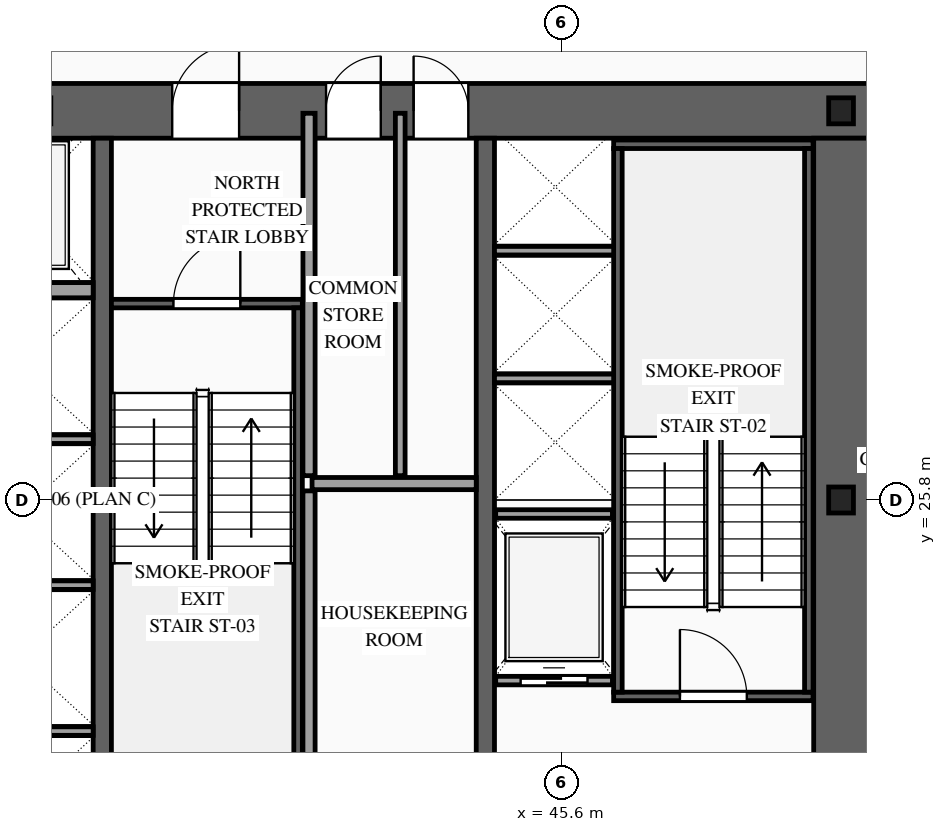
"""IFC4 building model, lengths in metres.
Left out: names, types, materials, properties, quantities, classifications, styles, units other than length and angle.
Written with IfcOpenShell. Run it as: python <this file> out.ifc"""

import sys

from ifc_helpers import new_model, si_unit, direction, frame, frame_2d, origin, origin_2d, place, context, subcontext, project, spatial, rectangle, i_section, extrude, source, transform, mapped, element, fill, save


model = new_model("IFC4")
c1 = context("Model", 3, precision=1e-05, world=origin(), true_north=direction((0.0, 1.0)))
c2 = subcontext(c1, "Body", "Model", "MODEL_VIEW")
j1 = project(units=[si_unit("LENGTHUNIT", "METRE"), si_unit("PLANEANGLEUNIT", "RADIAN")], contexts=[c1])
p1 = place(None, origin())
s1 = spatial("IfcSite", under=j1, at=p1, CompositionType="ELEMENT")
p2 = place(p1, origin())
s2 = spatial("IfcBuilding", under=s1, at=p2, CompositionType="ELEMENT")
p3 = place(p2, frame((0.0, 0.0, 71.2)))
s3 = spatial("IfcBuildingStorey", under=s2, at=p3, CompositionType="ELEMENT", Elevation=71.2)
p4 = place(p3, frame((23.35, 32.2, 0.0), z_axis=(0.0, 0.0, 1.0), x_axis=(1.0, 0.0, 0.0)))
e1 = element("IfcWall", 1, at=p4, inside=s3, PredefinedType="SHEAR", context=c2, shape_type="SweptSolid", body=[
    extrude(rectangle(XDim=27.3, YDim=0.9, at=frame_2d((13.65, 0.0))), origin(), (0.0, 0.0, 1.0), 3.6),
])
p5 = place(p4, frame((4.72, 0.0, 0.0)))
e2 = element("IfcOpeningElement", 2, at=p5, cuts=e1, PredefinedType="OPENING", context=c2, shape_type="SweptSolid", body=[
    extrude(rectangle(XDim=0.9, YDim=2.15, at=frame_2d((0.45, 1.075))), frame((0.0, 0.465, 0.0), z_axis=(0.0, -1.0, 0.0), x_axis=(1.0, 0.0, 0.0)), (0.0, 0.0, 1.0), 0.93),
])
p6 = place(p4, frame((10.0, 0.0, 0.0)))
e3 = element("IfcOpeningElement", 3, at=p6, cuts=e1, PredefinedType="OPENING", context=c2, shape_type="SweptSolid", body=[
    extrude(rectangle(XDim=1.1, YDim=2.2, at=frame_2d((0.55, 1.1))), frame((0.0, 0.465, 0.0), z_axis=(0.0, -1.0, 0.0), x_axis=(1.0, 0.0, 0.0)), (0.0, 0.0, 1.0), 0.93),
])
p7 = place(p4, frame((15.85, 0.0, 0.0)))
e4 = element("IfcOpeningElement", 4, at=p7, cuts=e1, PredefinedType="OPENING", context=c2, shape_type="SweptSolid", body=[
    extrude(rectangle(XDim=1.1, YDim=2.2, at=frame_2d((0.55, 1.1))), frame((0.0, 0.465, 0.0), z_axis=(0.0, -1.0, 0.0), x_axis=(1.0, 0.0, 0.0)), (0.0, 0.0, 1.0), 0.93),
])
p8 = place(p4, frame((18.38, 0.0, 0.0)))
e5 = element("IfcOpeningElement", 5, at=p8, cuts=e1, PredefinedType="OPENING", context=c2, shape_type="SweptSolid", body=[
    extrude(rectangle(XDim=0.9, YDim=2.15, at=frame_2d((0.45, 1.075))), frame((0.0, 0.465, 0.0), z_axis=(0.0, -1.0, 0.0), x_axis=(1.0, 0.0, 0.0)), (0.0, 0.0, 1.0), 0.93),
])
p9 = place(p4, frame((19.82, 0.0, 0.0)))
e6 = element("IfcOpeningElement", 6, at=p9, cuts=e1, PredefinedType="OPENING", context=c2, shape_type="SweptSolid", body=[
    extrude(rectangle(XDim=0.9, YDim=2.15, at=frame_2d((0.45, 1.075))), frame((0.0, 0.465, 0.0), z_axis=(0.0, -1.0, 0.0), x_axis=(1.0, 0.0, 0.0)), (0.0, 0.0, 1.0), 0.93),
])
m1 = source(origin(), c2, "Body", "SweptSolid", [
    extrude(rectangle(XDim=11.9, YDim=0.9, at=frame_2d((5.95, 0.0))), origin(), (0.0, 0.0, 1.0), 3.6),
])
p10 = place(p3, frame((50.2, 19.85, 0.0), z_axis=(0.0, 0.0, 1.0), x_axis=(0.0, 1.0, 0.0)))
e7 = element("IfcWall", 7, at=p10, inside=s3, PredefinedType="SHEAR", context=c2, shape_type="MappedRepresentation", body=[
    mapped(m1, transform((0.0, 0.0, 0.0), scale=1.0)),
])
m2 = source(origin(), c2, "Body", "SweptSolid", [
    extrude(rectangle(XDim=11.9, YDim=0.3, at=frame_2d((5.95, 0.0))), origin(), (0.0, 0.0, 1.0), 3.6),
])
for number, where, z_axis, x_axis in (
    (8, (38.05, 19.85, 0.0), (0.0, 0.0, 1.0), (0.0, 1.0, 0.0)),
    (9, (44.35, 19.85, 0.0), (0.0, 0.0, 1.0), (0.0, 1.0, 0.0)),
):
    element("IfcWall", number, at=place(p3, frame(where, z_axis=z_axis, x_axis=x_axis)), inside=s3, PredefinedType="SOLIDWALL", context=c2, shape_type="MappedRepresentation", body=[
        mapped(m2, transform((0.0, 0.0, 0.0), scale=1.0)),
    ])
m3 = source(origin(), c2, "Body", "SweptSolid", [
    extrude(i_section(OverallWidth=0.407, OverallDepth=0.428, WebThickness=0.02, FlangeThickness=0.035, at=origin_2d()), origin(), (0.0, 0.0, 1.0), 3.6),
])
for number, where, z_axis, x_axis in (
    (10, (50.2, 25.8, 0.0), (0.0, 0.0, 1.0), (1.0, 0.0, 0.0)),
    (11, (50.2, 32.2, 0.0), (0.0, 0.0, 1.0), (1.0, 0.0, 0.0)),
):
    element("IfcColumn", number, at=place(p3, frame(where, z_axis=z_axis, x_axis=x_axis)), inside=s3, PredefinedType="COLUMN", context=c2, shape_type="MappedRepresentation", body=[
        mapped(m3, transform((0.0, 0.0, 0.0), scale=1.0)),
    ])
p11 = place(p3, frame((44.52, 22.83, 0.0), z_axis=(0.0, 0.0, 1.0), x_axis=(1.0, 0.0, 0.0)))
e12 = element("IfcWall", 12, at=p11, inside=s3, PredefinedType="SOLIDWALL", context=c2, shape_type="SweptSolid", body=[
    extrude(rectangle(XDim=1.92, YDim=0.14, at=frame_2d((0.96, 0.0))), origin(), (0.0, 0.0, 1.0), 3.38),
])
p12 = place(p11, frame((0.41, 0.0, 0.0)))
e13 = element("IfcOpeningElement", 13, at=p12, cuts=e12, PredefinedType="OPENING", context=c2, shape_type="SweptSolid", body=[
    extrude(rectangle(XDim=1.1, YDim=2.2, at=frame_2d((0.55, 1.1))), frame((0.0, 0.085, 0.0), z_axis=(0.0, -1.0, 0.0), x_axis=(1.0, 0.0, 0.0)), (0.0, 0.0, 1.0), 0.17),
])
m4 = source(origin(), c2, "Body", "SweptSolid", [
    extrude(rectangle(XDim=1.92, YDim=0.14, at=frame_2d((0.96, 0.0))), origin(), (0.0, 0.0, 1.0), 3.38),
])
p13 = place(p3, frame((44.52, 25.57, 0.0), z_axis=(0.0, 0.0, 1.0), x_axis=(1.0, 0.0, 0.0)))
e14 = element("IfcWall", 14, at=p13, inside=s3, PredefinedType="SOLIDWALL", context=c2, shape_type="MappedRepresentation", body=[
    mapped(m4, transform((0.0, 0.0, 0.0), scale=1.0)),
])
m5 = source(origin(), c2, "Body", "SweptSolid", [
    extrude(rectangle(XDim=2.4, YDim=0.14, at=frame_2d((1.2, 0.0))), origin(), (0.0, 0.0, 1.0), 3.38),
])
for number, where, z_axis, x_axis in (
    (15, (35.5, 22.0, 0.0), (0.0, 0.0, 1.0), (1.0, 0.0, 0.0)),
    (16, (35.5, 24.4, 0.0), (0.0, 0.0, 1.0), (1.0, 0.0, 0.0)),
    (17, (35.5, 26.8, 0.0), (0.0, 0.0, 1.0), (1.0, 0.0, 0.0)),
):
    element("IfcWall", number, at=place(p3, frame(where, z_axis=z_axis, x_axis=x_axis)), inside=s3, PredefinedType="SOLIDWALL", context=c2, shape_type="MappedRepresentation", body=[
        mapped(m5, transform((0.0, 0.0, 0.0), scale=1.0)),
    ])
m6 = source(origin(), c2, "Body", "SweptSolid", [
    extrude(rectangle(XDim=2.4, YDim=0.25, at=frame_2d((1.2, 0.0))), origin(), (0.0, 0.0, 1.0), 3.38),
])
p14 = place(p3, frame((35.5, 29.25, 0.0), z_axis=(0.0, 0.0, 1.0), x_axis=(1.0, 0.0, 0.0)))
e18 = element("IfcWall", 18, at=p14, inside=s3, PredefinedType="SOLIDWALL", context=c2, shape_type="MappedRepresentation", body=[
    mapped(m6, transform((0.0, 0.0, 0.0), scale=1.0)),
])
m7 = source(origin(), c2, "Body", "SweptSolid", [
    extrude(rectangle(XDim=2.0, YDim=0.14, at=frame_2d((1.0, 0.0))), origin(), (0.0, 0.0, 1.0), 3.38),
])
for number, where, z_axis, x_axis in (
    (19, (44.5, 27.8, 0.0), (0.0, 0.0, 1.0), (1.0, 0.0, 0.0)),
    (20, (44.5, 29.9, 0.0), (0.0, 0.0, 1.0), (1.0, 0.0, 0.0)),
):
    element("IfcWall", number, at=place(p3, frame(where, z_axis=z_axis, x_axis=x_axis)), inside=s3, PredefinedType="SOLIDWALL", context=c2, shape_type="MappedRepresentation", body=[
        mapped(m7, transform((0.0, 0.0, 0.0), scale=1.0)),
    ])
p15 = place(p3, frame((46.46, 22.57, 0.0), z_axis=(0.0, 0.0, 1.0), x_axis=(1.0, 0.0, 0.0)))
e21 = element("IfcWall", 21, at=p15, inside=s3, PredefinedType="SOLIDWALL", context=c2, shape_type="SweptSolid", body=[
    extrude(rectangle(XDim=3.28, YDim=0.14, at=frame_2d((1.64, 0.0))), origin(), (0.0, 0.0, 1.0), 3.38),
])
p16 = place(p15, frame((1.09, 0.0, 0.0)))
e22 = element("IfcOpeningElement", 22, at=p16, cuts=e21, PredefinedType="OPENING", context=c2, shape_type="SweptSolid", body=[
    extrude(rectangle(XDim=1.1, YDim=2.2, at=frame_2d((0.55, 1.1))), frame((0.0, 0.085, 0.0), z_axis=(0.0, -1.0, 0.0), x_axis=(1.0, 0.0, 0.0)), (0.0, 0.0, 1.0), 0.17),
])
m8 = source(origin(), c2, "Body", "SweptSolid", [
    extrude(rectangle(XDim=3.28, YDim=0.14, at=frame_2d((1.64, 0.0))), origin(), (0.0, 0.0, 1.0), 3.38),
])
p17 = place(p3, frame((46.46, 31.65, 0.0), z_axis=(0.0, 0.0, 1.0), x_axis=(1.0, 0.0, 0.0)))
e23 = element("IfcWall", 23, at=p17, inside=s3, PredefinedType="SOLIDWALL", context=c2, shape_type="MappedRepresentation", body=[
    mapped(m8, transform((0.0, 0.0, 0.0), scale=1.0)),
])
m9 = source(origin(), c2, "Body", "SweptSolid", [
    extrude(rectangle(XDim=8.94, YDim=0.14, at=frame_2d((4.47, 0.0))), origin(), (0.0, 0.0, 1.0), 3.38),
])
for number, where, z_axis, x_axis in (
    (24, (46.53, 22.64, 0.0), (0.0, 0.0, 1.0), (0.0, 1.0, 0.0)),
    (25, (49.67, 22.64, 0.0), (0.0, 0.0, 1.0), (0.0, 1.0, 0.0)),
):
    element("IfcWall", number, at=place(p3, frame(where, z_axis=z_axis, x_axis=x_axis)), inside=s3, PredefinedType="SOLIDWALL", context=c2, shape_type="MappedRepresentation", body=[
        mapped(m9, transform((0.0, 0.0, 0.0), scale=1.0)),
    ])
p18 = place(p3, frame((38.2, 29.03, 0.0), z_axis=(0.0, 0.0, 1.0), x_axis=(1.0, 0.0, 0.0)))
e26 = element("IfcWall", 26, at=p18, inside=s3, PredefinedType="SOLIDWALL", context=c2, shape_type="SweptSolid", body=[
    extrude(rectangle(XDim=3.14, YDim=0.14, at=frame_2d((1.57, 0.0))), origin(), (0.0, 0.0, 1.0), 3.38),
])
p19 = place(p18, frame((1.02, 0.0, 0.0)))
e27 = element("IfcOpeningElement", 27, at=p19, cuts=e26, PredefinedType="OPENING", context=c2, shape_type="SweptSolid", body=[
    extrude(rectangle(XDim=1.1, YDim=2.2, at=frame_2d((0.55, 1.1))), frame((0.0, 0.085, 0.0), z_axis=(0.0, -1.0, 0.0), x_axis=(1.0, 0.0, 0.0)), (0.0, 0.0, 1.0), 0.17),
])
m10 = source(origin(), c2, "Body", "SweptSolid", [
    extrude(rectangle(XDim=8.94, YDim=0.14, at=frame_2d((4.47, 0.0))), origin(), (0.0, 0.0, 1.0), 3.38),
])
p20 = place(p3, frame((41.27, 20.02, 0.0), z_axis=(0.0, 0.0, 1.0), x_axis=(0.0, 1.0, 0.0)))
e28 = element("IfcWall", 28, at=p20, inside=s3, PredefinedType="SOLIDWALL", context=c2, shape_type="MappedRepresentation", body=[
    mapped(m10, transform((0.0, 0.0, 0.0), scale=1.0)),
])
m11 = source(origin(), c2, "Body", "SweptSolid", [
    extrude(rectangle(XDim=6.51, YDim=0.2, at=frame_2d((3.255, 0.0))), origin(), (0.0, 0.0, 1.0), 3.38),
])
p21 = place(p3, frame((41.45, 19.44, 0.0), z_axis=(0.0, 0.0, 1.0), x_axis=(0.0, 1.0, 0.0)))
e29 = element("IfcWall", 29, at=p21, inside=s3, PredefinedType="PARTITIONING", context=c2, shape_type="MappedRepresentation", body=[
    mapped(m11, transform((0.0, 0.0, 0.0), scale=1.0)),
])
m12 = source(origin(), c2, "Body", "SweptSolid", [
    extrude(rectangle(XDim=2.7, YDim=0.2, at=frame_2d((1.35, 0.0))), origin(), (0.0, 0.0, 1.0), 3.38),
])
p22 = place(p3, frame((41.5, 26.07, 0.0), z_axis=(0.0, 0.0, 1.0), x_axis=(1.0, 0.0, 0.0)))
e30 = element("IfcWall", 30, at=p22, inside=s3, PredefinedType="PARTITIONING", context=c2, shape_type="MappedRepresentation", body=[
    mapped(m12, transform((0.0, 0.0, 0.0), scale=1.0)),
])
m13 = source(origin(), c2, "Body", "SweptSolid", [
    extrude(rectangle(XDim=5.96, YDim=0.2, at=frame_2d((2.98, 0.0))), origin(), (0.0, 0.0, 1.0), 3.38),
])
p23 = place(p3, frame((41.45, 26.2, 0.0), z_axis=(0.0, 0.0, 1.0), x_axis=(0.0, 1.0, 0.0)))
e31 = element("IfcWall", 31, at=p23, inside=s3, PredefinedType="PARTITIONING", context=c2, shape_type="MappedRepresentation", body=[
    mapped(m13, transform((0.0, 0.0, 0.0), scale=1.0)),
])
m14 = source(origin(), c2, "Body", "SweptSolid", [
    extrude(rectangle(XDim=5.96, YDim=0.16, at=frame_2d((2.98, 0.0))), origin(), (0.0, 0.0, 1.0), 3.38),
])
p24 = place(p3, frame((42.95, 26.2, 0.0), z_axis=(0.0, 0.0, 1.0), x_axis=(0.0, 1.0, 0.0)))
e32 = element("IfcWall", 32, at=p24, inside=s3, PredefinedType="PARTITIONING", context=c2, shape_type="MappedRepresentation", body=[
    mapped(m14, transform((0.0, 0.0, 0.0), scale=1.0)),
])
m15 = source(origin(), c2, "Body", "SweptSolid", [
    extrude(rectangle(XDim=1.1, YDim=2.2, at=frame_2d((0.55, 1.1))), frame((0.0, 0.025, 0.0), z_axis=(0.0, -1.0, 0.0), x_axis=(1.0, 0.0, 0.0)), (0.0, 0.0, 1.0), 0.05),
])
p25 = place(p12, origin())
e33 = element("IfcDoor", 33, at=p25, inside=s3, OperationType="SLIDING_TO_RIGHT", PredefinedType="DOOR", context=c2, shape_type="MappedRepresentation", body=[
    mapped(m15, transform((0.0, 0.0, 0.0), scale=1.0)),
])
fill(e13, e33)
m16 = source(origin(), c2, "Body", "SweptSolid", [
    extrude(rectangle(XDim=1.1, YDim=2.2, at=frame_2d((0.55, 1.1))), frame((0.0, 0.025, 0.0), z_axis=(0.0, -1.0, 0.0), x_axis=(1.0, 0.0, 0.0)), (0.0, 0.0, 1.0), 0.05),
])
p26 = place(p16, origin())
e34 = element("IfcDoor", 34, at=p26, inside=s3, OperationType="SINGLE_SWING_LEFT", PredefinedType="DOOR", context=c2, shape_type="MappedRepresentation", body=[
    mapped(m16, transform((0.0, 0.0, 0.0), scale=1.0)),
])
fill(e22, e34)
p27 = place(p19, origin())
e35 = element("IfcDoor", 35, at=p27, inside=s3, OperationType="SINGLE_SWING_RIGHT", PredefinedType="DOOR", context=c2, shape_type="MappedRepresentation", body=[
    mapped(m16, transform((0.0, 0.0, 0.0), scale=1.0)),
])
fill(e27, e35)
p28 = place(p7, origin())
e36 = element("IfcDoor", 36, at=p28, inside=s3, OperationType="SINGLE_SWING_RIGHT", PredefinedType="DOOR", context=c2, shape_type="MappedRepresentation", body=[
    mapped(m16, transform((0.0, 0.0, 0.0), scale=1.0)),
])
fill(e4, e36)
m17 = source(origin(), c2, "Body", "SweptSolid", [
    extrude(rectangle(XDim=0.9, YDim=2.15, at=frame_2d((0.45, 1.075))), frame((0.0, 0.025, 0.0), z_axis=(0.0, -1.0, 0.0), x_axis=(1.0, 0.0, 0.0)), (0.0, 0.0, 1.0), 0.05),
])
p29 = place(p8, origin())
e37 = element("IfcDoor", 37, at=p29, inside=s3, OperationType="SINGLE_SWING_RIGHT", PredefinedType="DOOR", context=c2, shape_type="MappedRepresentation", body=[
    mapped(m17, transform((0.0, 0.0, 0.0), scale=1.0)),
])
fill(e5, e37)
p30 = place(p9, origin())
e38 = element("IfcDoor", 38, at=p30, inside=s3, OperationType="SINGLE_SWING_LEFT", PredefinedType="DOOR", context=c2, shape_type="MappedRepresentation", body=[
    mapped(m17, transform((0.0, 0.0, 0.0), scale=1.0)),
])
fill(e6, e38)
save(model, sys.argv[1])
